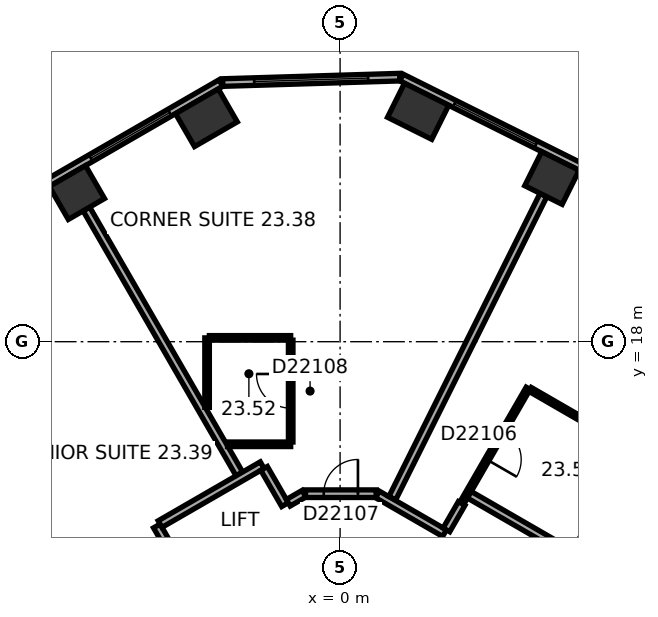
"""IFC4 building model, lengths in metres.
Left out: names, types, materials, properties, quantities, classifications, styles, units other than length and angle.
Written with IfcOpenShell. Run it as: python <this file> out.ifc"""

import sys

from ifc_helpers import new_model, si_unit, direction, frame, frame_2d, origin, origin_2d, place, context, subcontext, project, spatial, rectangle, extrude, element, fill, save


model = new_model("IFC4")
c1 = context("Model", 3, precision=1e-05, world=origin(), true_north=direction((0.0, 1.0)))
c2 = subcontext(c1, "Body", "Model", "MODEL_VIEW")
j1 = project(units=[si_unit("LENGTHUNIT", "METRE"), si_unit("PLANEANGLEUNIT", "RADIAN")], contexts=[c1])
p1 = place(None, origin())
s1 = spatial("IfcSite", under=j1, at=p1, CompositionType="ELEMENT")
p2 = place(p1, origin())
s2 = spatial("IfcBuilding", under=s1, at=p2, CompositionType="ELEMENT")
p3 = place(p2, frame((0.0, 0.0, 100.1)))
s3 = spatial("IfcBuildingStorey", under=s2, at=p3, CompositionType="ELEMENT", Elevation=100.1)
p4 = place(p3, frame((5.574, 22.306, 0.0), z_axis=(0.0, 0.0, 1.0), x_axis=(-0.894934361602, 0.44619781311, 0.0)))
e1 = element("IfcColumn", 1, at=p4, inside=s3, PredefinedType="COLUMN", context=c2, shape_type="SweptSolid", body=[
    extrude(rectangle(XDim=1.1, YDim=1.0, at=origin_2d()), origin(), (0.0, 0.0, 1.0), 3.3),
])
for number, where, z_axis, x_axis in (
    (2, (2.053, 24.062, 0.0), (0.0, 0.0, 1.0), (-0.895, 0.446, 0.0)),
    (3, (-3.518, 23.892, 0.0), (0.0, 0.0, 1.0), (-0.866, -0.5, 0.0)),
):
    element("IfcColumn", number, at=place(p3, frame(where, z_axis=z_axis, x_axis=x_axis)), inside=s3, PredefinedType="COLUMN", context=c2, shape_type="SweptSolid", body=[
        extrude(rectangle(XDim=1.3, YDim=1.0, at=origin_2d()), origin(), (0.0, 0.0, 1.0), 3.3),
    ])
p5 = place(p3, frame((-6.926, 21.925, 0.0), z_axis=(0.0, 0.0, 1.0), x_axis=(-0.866025403784, -0.5, 0.0)))
e4 = element("IfcColumn", 4, at=p5, inside=s3, PredefinedType="COLUMN", context=c2, shape_type="SweptSolid", body=[
    extrude(rectangle(XDim=1.1, YDim=1.0, at=origin_2d()), origin(), (0.0, 0.0, 1.0), 3.3),
])
p6 = place(p3, frame((20.63, 15.47, 0.0), z_axis=(0.0, 0.0, 1.0), x_axis=(-0.894934518609, 0.446197498203, 0.0)))
e5 = element("IfcWall", 5, at=p6, inside=s3, PredefinedType="STANDARD", context=c2, shape_type="SweptSolid", body=[
    extrude(rectangle(XDim=21.246, YDim=0.2, at=frame_2d((10.623, 0.0))), origin(), (0.0, 0.0, 1.0), 3.3),
])
p7 = place(p6, frame((1.553, 0.0, 0.8)))
e6 = element("IfcOpeningElement", 6, at=p7, cuts=e5, PredefinedType="OPENING", context=c2, shape_type="SweptSolid", body=[
    extrude(rectangle(XDim=2.4, YDim=1.7, at=frame_2d((1.2, 0.85))), frame((0.0, 0.11, 0.0), z_axis=(0.0, -1.0, 0.0), x_axis=(1.0, 0.0, 0.0)), (0.0, 0.0, 1.0), 0.22),
])
p8 = place(p6, frame((5.488, 0.0, 0.8)))
e7 = element("IfcOpeningElement", 7, at=p8, cuts=e5, PredefinedType="OPENING", context=c2, shape_type="SweptSolid", body=[
    extrude(rectangle(XDim=2.4, YDim=1.7, at=frame_2d((1.2, 0.85))), frame((0.0, 0.11, 0.0), z_axis=(0.0, -1.0, 0.0), x_axis=(1.0, 0.0, 0.0)), (0.0, 0.0, 1.0), 0.22),
])
p9 = place(p6, frame((9.422, 0.0, 0.8)))
e8 = element("IfcOpeningElement", 8, at=p9, cuts=e5, PredefinedType="OPENING", context=c2, shape_type="SweptSolid", body=[
    extrude(rectangle(XDim=2.4, YDim=1.7, at=frame_2d((1.2, 0.85))), frame((0.0, 0.11, 0.0), z_axis=(0.0, -1.0, 0.0), x_axis=(1.0, 0.0, 0.0)), (0.0, 0.0, 1.0), 0.22),
])
p10 = place(p6, frame((13.357, 0.0, 0.8)))
e9 = element("IfcOpeningElement", 9, at=p10, cuts=e5, PredefinedType="OPENING", context=c2, shape_type="SweptSolid", body=[
    extrude(rectangle(XDim=2.4, YDim=1.7, at=frame_2d((1.2, 0.85))), frame((0.0, 0.11, 0.0), z_axis=(0.0, -1.0, 0.0), x_axis=(1.0, 0.0, 0.0)), (0.0, 0.0, 1.0), 0.22),
])
p11 = place(p6, frame((17.292, 0.0, 0.8)))
e10 = element("IfcOpeningElement", 10, at=p11, cuts=e5, PredefinedType="OPENING", context=c2, shape_type="SweptSolid", body=[
    extrude(rectangle(XDim=2.4, YDim=1.7, at=frame_2d((1.2, 0.85))), frame((0.0, 0.11, 0.0), z_axis=(0.0, -1.0, 0.0), x_axis=(1.0, 0.0, 0.0)), (0.0, 0.0, 1.0), 0.22),
])
p12 = place(p3, frame((1.568, 24.961, 0.0), z_axis=(0.0, 0.0, 1.0), x_axis=(-0.999533359013, -0.030546099927, 0.0)))
e11 = element("IfcWall", 11, at=p12, inside=s3, PredefinedType="STANDARD", context=c2, shape_type="SweptSolid", body=[
    extrude(rectangle(XDim=4.66, YDim=0.2, at=frame_2d((2.33, 0.0))), origin(), (0.0, 0.0, 1.0), 3.3),
])
p13 = place(p12, frame((0.83, 0.0, 0.8)))
e12 = element("IfcOpeningElement", 12, at=p13, cuts=e11, PredefinedType="OPENING", context=c2, shape_type="SweptSolid", body=[
    extrude(rectangle(XDim=3.0, YDim=1.7, at=frame_2d((1.5, 0.85))), frame((0.0, 0.11, 0.0), z_axis=(0.0, -1.0, 0.0), x_axis=(1.0, 0.0, 0.0)), (0.0, 0.0, 1.0), 0.22),
])
p14 = place(p3, frame((-3.136, 24.805, 0.0), z_axis=(0.0, 0.0, 1.0), x_axis=(-0.866028291626, -0.499994998079, 0.0)))
e13 = element("IfcWall", 13, at=p14, inside=s3, PredefinedType="STANDARD", context=c2, shape_type="SweptSolid", body=[
    extrude(rectangle(XDim=21.246, YDim=0.2, at=frame_2d((10.623, 0.0))), origin(), (0.0, 0.0, 1.0), 3.3),
])
p15 = place(p14, frame((1.555, 0.0, 0.8)))
e14 = element("IfcOpeningElement", 14, at=p15, cuts=e13, PredefinedType="OPENING", context=c2, shape_type="SweptSolid", body=[
    extrude(rectangle(XDim=2.4, YDim=1.7, at=frame_2d((1.2, 0.85))), frame((0.0, 0.11, 0.0), z_axis=(0.0, -1.0, 0.0), x_axis=(1.0, 0.0, 0.0)), (0.0, 0.0, 1.0), 0.22),
])
p16 = place(p14, frame((5.489, 0.0, 0.8)))
e15 = element("IfcOpeningElement", 15, at=p16, cuts=e13, PredefinedType="OPENING", context=c2, shape_type="SweptSolid", body=[
    extrude(rectangle(XDim=2.4, YDim=1.7, at=frame_2d((1.2, 0.85))), frame((0.0, 0.11, 0.0), z_axis=(0.0, -1.0, 0.0), x_axis=(1.0, 0.0, 0.0)), (0.0, 0.0, 1.0), 0.22),
])
p17 = place(p14, frame((9.424, 0.0, 0.8)))
e16 = element("IfcOpeningElement", 16, at=p17, cuts=e13, PredefinedType="OPENING", context=c2, shape_type="SweptSolid", body=[
    extrude(rectangle(XDim=2.4, YDim=1.7, at=frame_2d((1.2, 0.85))), frame((0.0, 0.11, 0.0), z_axis=(0.0, -1.0, 0.0), x_axis=(1.0, 0.0, 0.0)), (0.0, 0.0, 1.0), 0.22),
])
p18 = place(p14, frame((13.358, 0.0, 0.8)))
e17 = element("IfcOpeningElement", 17, at=p18, cuts=e13, PredefinedType="OPENING", context=c2, shape_type="SweptSolid", body=[
    extrude(rectangle(XDim=2.4, YDim=1.7, at=frame_2d((1.2, 0.85))), frame((0.0, 0.11, 0.0), z_axis=(0.0, -1.0, 0.0), x_axis=(1.0, 0.0, 0.0)), (0.0, 0.0, 1.0), 0.22),
])
p19 = place(p14, frame((17.293, 0.0, 0.8)))
e18 = element("IfcOpeningElement", 18, at=p19, cuts=e13, PredefinedType="OPENING", context=c2, shape_type="SweptSolid", body=[
    extrude(rectangle(XDim=2.4, YDim=1.7, at=frame_2d((1.2, 0.85))), frame((0.0, 0.11, 0.0), z_axis=(0.0, -1.0, 0.0), x_axis=(1.0, 0.0, 0.0)), (0.0, 0.0, 1.0), 0.22),
])
p20 = place(p3, frame((-7.934, 13.133, 0.0), z_axis=(0.0, 0.0, 1.0), x_axis=(0.499938597367, -0.866060851709, 0.0)))
e19 = element("IfcWall", 19, at=p20, inside=s3, PredefinedType="PARTITIONING", context=c2, shape_type="SweptSolid", body=[
    extrude(rectangle(XDim=2.64, YDim=0.12, at=frame_2d((1.32, 0.0))), origin(), (0.0, 0.0, 1.0), 3.05),
])
p21 = place(p20, frame((0.87, 0.0, 0.0)))
e20 = element("IfcOpeningElement", 20, at=p21, cuts=e19, PredefinedType="OPENING", context=c2, shape_type="SweptSolid", body=[
    extrude(rectangle(XDim=0.9, YDim=2.1, at=frame_2d((0.45, 1.05))), frame((0.0, 0.07, 0.0), z_axis=(0.0, -1.0, 0.0), x_axis=(1.0, 0.0, 0.0)), (0.0, 0.0, 1.0), 0.14),
])
p22 = place(p3, frame((-6.676, 21.492, 0.0), z_axis=(0.0, 0.0, 1.0), x_axis=(0.500011263043, -0.866018900966, 0.0)))
e21 = element("IfcWall", 21, at=p22, inside=s3, PredefinedType="PARTITIONING", context=c2, shape_type="SweptSolid", body=[
    extrude(rectangle(XDim=8.049, YDim=0.2, at=frame_2d((4.024, 0.0))), origin(), (0.0, 0.0, 1.0), 3.05),
])
p23 = place(p3, frame((-4.823, 13.152, 0.0), z_axis=(0.0, 0.0, 1.0), x_axis=(0.499986357472, -0.866033280158, 0.0)))
e22 = element("IfcWall", 22, at=p23, inside=s3, PredefinedType="PARTITIONING", context=c2, shape_type="SweptSolid", body=[
    extrude(rectangle(XDim=1.201, YDim=0.2, at=frame_2d((0.601, 0.0))), origin(), (0.0, 0.0, 1.0), 3.05),
])
p24 = place(p3, frame((-3.5, 16.271, 0.0), z_axis=(0.0, 0.0, 1.0), x_axis=(0.0, 1.0, 0.0)))
e23 = element("IfcWall", 23, at=p24, inside=s3, PredefinedType="PARTITIONING", context=c2, shape_type="SweptSolid", body=[
    extrude(rectangle(XDim=1.829, YDim=0.12, at=frame_2d((0.915, 0.0))), origin(), (0.0, 0.0, 1.0), 3.05),
])
p25 = place(p3, frame((-3.44, 18.101, 0.0), z_axis=(0.0, 0.0, 1.0), x_axis=(1.0, 0.0, 0.0)))
e24 = element("IfcWall", 24, at=p25, inside=s3, PredefinedType="PARTITIONING", context=c2, shape_type="SweptSolid", body=[
    extrude(rectangle(XDim=2.14, YDim=0.12, at=frame_2d((1.07, 0.0))), origin(), (0.0, 0.0, 1.0), 3.05),
])
p26 = place(p3, frame((-2.05, 14.752, 0.0), z_axis=(0.0, 0.0, 1.0), x_axis=(-0.866030936828, -0.499990416364, 0.0)))
e25 = element("IfcWall", 25, at=p26, inside=s3, PredefinedType="PARTITIONING", context=c2, shape_type="SweptSolid", body=[
    extrude(rectangle(XDim=3.102, YDim=0.2, at=frame_2d((1.551, 0.0))), origin(), (0.0, 0.0, 1.0), 3.05),
])
p27 = place(p3, frame((-1.449, 13.712, 0.0), z_axis=(0.0, 0.0, 1.0), x_axis=(-0.499978356969, 0.866037899034, 0.0)))
e26 = element("IfcWall", 26, at=p27, inside=s3, PredefinedType="PARTITIONING", context=c2, shape_type="SweptSolid", body=[
    extrude(rectangle(XDim=1.101, YDim=0.2, at=frame_2d((0.551, 0.0))), origin(), (0.0, 0.0, 1.0), 3.05),
])
p28 = place(p3, frame((-1.3, 15.301, 0.0), z_axis=(0.0, 0.0, 1.0), x_axis=(-1.0, 0.0, 0.0)))
e27 = element("IfcWall", 27, at=p28, inside=s3, PredefinedType="PARTITIONING", context=c2, shape_type="SweptSolid", body=[
    extrude(rectangle(XDim=1.661, YDim=0.12, at=frame_2d((0.831, 0.0))), origin(), (0.0, 0.0, 1.0), 3.05),
])
p29 = place(p3, frame((-1.3, 18.041, 0.0), z_axis=(0.0, 0.0, 1.0), x_axis=(0.0, -1.0, 0.0)))
e28 = element("IfcWall", 28, at=p29, inside=s3, PredefinedType="PARTITIONING", context=c2, shape_type="SweptSolid", body=[
    extrude(rectangle(XDim=2.68, YDim=0.12, at=frame_2d((1.34, 0.0))), origin(), (0.0, 0.0, 1.0), 3.05),
])
p30 = place(p29, frame((0.89, 0.0, 0.0)))
e29 = element("IfcOpeningElement", 29, at=p30, cuts=e28, PredefinedType="OPENING", context=c2, shape_type="SweptSolid", body=[
    extrude(rectangle(XDim=0.9, YDim=2.1, at=frame_2d((0.45, 1.05))), frame((0.0, 0.07, 0.0), z_axis=(0.0, -1.0, 0.0), x_axis=(1.0, 0.0, 0.0)), (0.0, 0.0, 1.0), 0.14),
])
p31 = place(p3, frame((-0.95, 14.001, 0.0), z_axis=(0.0, 0.0, 1.0), x_axis=(-0.86609177584, -0.499885022602, 0.0)))
e30 = element("IfcWall", 30, at=p31, inside=s3, PredefinedType="PARTITIONING", context=c2, shape_type="SweptSolid", body=[
    extrude(rectangle(XDim=0.477, YDim=0.2, at=frame_2d((0.238, 0.0))), origin(), (0.0, 0.0, 1.0), 3.05),
])
p32 = place(p3, frame((0.95, 14.001, 0.0), z_axis=(0.0, 0.0, 1.0), x_axis=(-1.0, 0.0, 0.0)))
e31 = element("IfcWall", 31, at=p32, inside=s3, PredefinedType="PARTITIONING", context=c2, shape_type="SweptSolid", body=[
    extrude(rectangle(XDim=1.86, YDim=0.2, at=frame_2d((0.93, 0.0))), origin(), (0.0, 0.0, 1.0), 3.05),
])
p33 = place(p32, frame((0.48, 0.0, 0.0)))
e32 = element("IfcOpeningElement", 32, at=p33, cuts=e31, PredefinedType="OPENING", context=c2, shape_type="SweptSolid", body=[
    extrude(rectangle(XDim=0.9, YDim=2.1, at=frame_2d((0.45, 1.05))), frame((0.0, 0.11, 0.0), z_axis=(0.0, -1.0, 0.0), x_axis=(1.0, 0.0, 0.0)), (0.0, 0.0, 1.0), 0.22),
])
p34 = place(p3, frame((2.748, 12.962, 0.0), z_axis=(0.0, 0.0, 1.0), x_axis=(-0.866013897511, 0.50001992892, 0.0)))
e33 = element("IfcWall", 33, at=p34, inside=s3, PredefinedType="PARTITIONING", context=c2, shape_type="SweptSolid", body=[
    extrude(rectangle(XDim=2.037, YDim=0.2, at=frame_2d((1.018, 0.0))), origin(), (0.0, 0.0, 1.0), 3.05),
])
p35 = place(p3, frame((3.199, 13.743, 0.0), z_axis=(0.0, 0.0, 1.0), x_axis=(-0.500170954823, -0.865926680471, 0.0)))
e34 = element("IfcWall", 34, at=p35, inside=s3, PredefinedType="PARTITIONING", context=c2, shape_type="SweptSolid", body=[
    extrude(rectangle(XDim=0.801, YDim=0.2, at=frame_2d((0.4, 0.0))), origin(), (0.0, 0.0, 1.0), 3.05),
])
p36 = place(p3, frame((3.232, 13.8, 0.0), z_axis=(0.0, 0.0, 1.0), x_axis=(0.499993265928, 0.866029291668, 0.0)))
e35 = element("IfcWall", 35, at=p36, inside=s3, PredefinedType="PARTITIONING", context=c2, shape_type="SweptSolid", body=[
    extrude(rectangle(XDim=3.434, YDim=0.12, at=frame_2d((1.717, 0.0))), origin(), (0.0, 0.0, 1.0), 3.05),
])
p37 = place(p36, frame((1.267, 0.0, 0.0)))
e36 = element("IfcOpeningElement", 36, at=p37, cuts=e35, PredefinedType="OPENING", context=c2, shape_type="SweptSolid", body=[
    extrude(rectangle(XDim=0.9, YDim=2.1, at=frame_2d((0.45, 1.05))), frame((0.0, 0.07, 0.0), z_axis=(0.0, -1.0, 0.0), x_axis=(1.0, 0.0, 0.0)), (0.0, 0.0, 1.0), 0.14),
])
p38 = place(p3, frame((5.001, 16.744, 0.0), z_axis=(0.0, 0.0, 1.0), x_axis=(0.866009488468, -0.500027565123, 0.0)))
e37 = element("IfcWall", 37, at=p38, inside=s3, PredefinedType="PARTITIONING", context=c2, shape_type="SweptSolid", body=[
    extrude(rectangle(XDim=3.14, YDim=0.12, at=frame_2d((1.57, 0.0))), origin(), (0.0, 0.0, 1.0), 3.05),
])
p39 = place(p3, frame((5.351, 21.859, 0.0), z_axis=(0.0, 0.0, 1.0), x_axis=(-0.446205309328, -0.894930624086, 0.0)))
e38 = element("IfcWall", 38, at=p39, inside=s3, PredefinedType="PARTITIONING", context=c2, shape_type="SweptSolid", body=[
    extrude(rectangle(XDim=8.913, YDim=0.2, at=frame_2d((4.457, 0.0))), origin(), (0.0, 0.0, 1.0), 2.6),
])
p40 = place(p3, frame((7.69, 15.122, 0.0), z_axis=(0.0, 0.0, 1.0), x_axis=(-0.499991248344, -0.866030456496, 0.0)))
e39 = element("IfcWall", 39, at=p40, inside=s3, PredefinedType="PARTITIONING", context=c2, shape_type="SweptSolid", body=[
    extrude(rectangle(XDim=3.04, YDim=0.12, at=frame_2d((1.52, 0.0))), origin(), (0.0, 0.0, 1.0), 3.05),
])
p41 = place(p3, frame((10.885, 9.652, 0.0), z_axis=(0.0, 0.0, 1.0), x_axis=(-0.866033630405, 0.499985750804, 0.0)))
e40 = element("IfcWall", 40, at=p41, inside=s3, PredefinedType="PARTITIONING", context=c2, shape_type="SweptSolid", body=[
    extrude(rectangle(XDim=8.642, YDim=0.2, at=frame_2d((4.321, 0.0))), origin(), (0.0, 0.0, 1.0), 3.05),
])
p42 = place(p41, frame((2.276, 0.0, 0.0)))
e41 = element("IfcOpeningElement", 41, at=p42, cuts=e40, PredefinedType="OPENING", context=c2, shape_type="SweptSolid", body=[
    extrude(rectangle(XDim=0.9, YDim=2.1, at=frame_2d((0.45, 1.05))), frame((0.0, 0.11, 0.0), z_axis=(0.0, -1.0, 0.0), x_axis=(1.0, 0.0, 0.0)), (0.0, 0.0, 1.0), 0.22),
])
p43 = place(p11, origin())
e42 = element("IfcWindow", 42, at=p43, inside=s3, PartitioningType="SINGLE_PANEL", PredefinedType="WINDOW", context=c2, shape_type="SweptSolid", body=[
    extrude(rectangle(XDim=2.4, YDim=1.7, at=frame_2d((1.2, 0.85))), frame((0.0, 0.03, 0.0), z_axis=(0.0, -1.0, 0.0), x_axis=(1.0, 0.0, 0.0)), (0.0, 0.0, 1.0), 0.06),
])
fill(e10, e42)
p44 = place(p13, origin())
e43 = element("IfcWindow", 43, at=p44, inside=s3, PartitioningType="SINGLE_PANEL", PredefinedType="WINDOW", context=c2, shape_type="SweptSolid", body=[
    extrude(rectangle(XDim=3.0, YDim=1.7, at=frame_2d((1.5, 0.85))), frame((0.0, 0.03, 0.0), z_axis=(0.0, -1.0, 0.0), x_axis=(1.0, 0.0, 0.0)), (0.0, 0.0, 1.0), 0.06),
])
fill(e12, e43)
p45 = place(p15, origin())
e44 = element("IfcWindow", 44, at=p45, inside=s3, PartitioningType="SINGLE_PANEL", PredefinedType="WINDOW", context=c2, shape_type="SweptSolid", body=[
    extrude(rectangle(XDim=2.4, YDim=1.7, at=frame_2d((1.2, 0.85))), frame((0.0, 0.03, 0.0), z_axis=(0.0, -1.0, 0.0), x_axis=(1.0, 0.0, 0.0)), (0.0, 0.0, 1.0), 0.06),
])
fill(e14, e44)
p46 = place(p37, origin())
e45 = element("IfcDoor", 45, at=p46, inside=s3, OperationType="SINGLE_SWING_LEFT", PredefinedType="DOOR", context=c2, shape_type="SweptSolid", body=[
    extrude(rectangle(XDim=0.9, YDim=2.1, at=frame_2d((0.45, 1.05))), frame((0.0, 0.025, 0.0), z_axis=(0.0, -1.0, 0.0), x_axis=(1.0, 0.0, 0.0)), (0.0, 0.0, 1.0), 0.05),
])
fill(e36, e45)
p47 = place(p33, origin())
e46 = element("IfcDoor", 46, at=p47, inside=s3, OperationType="SINGLE_SWING_LEFT", PredefinedType="DOOR", context=c2, shape_type="SweptSolid", body=[
    extrude(rectangle(XDim=0.9, YDim=2.1, at=frame_2d((0.45, 1.05))), frame((0.0, 0.025, 0.0), z_axis=(0.0, -1.0, 0.0), x_axis=(1.0, 0.0, 0.0)), (0.0, 0.0, 1.0), 0.05),
])
fill(e32, e46)
p48 = place(p30, origin())
e47 = element("IfcDoor", 47, at=p48, inside=s3, OperationType="SINGLE_SWING_LEFT", PredefinedType="DOOR", context=c2, shape_type="SweptSolid", body=[
    extrude(rectangle(XDim=0.9, YDim=2.1, at=frame_2d((0.45, 1.05))), frame((0.0, 0.025, 0.0), z_axis=(0.0, -1.0, 0.0), x_axis=(1.0, 0.0, 0.0)), (0.0, 0.0, 1.0), 0.05),
])
fill(e29, e47)
save(model, sys.argv[1])
